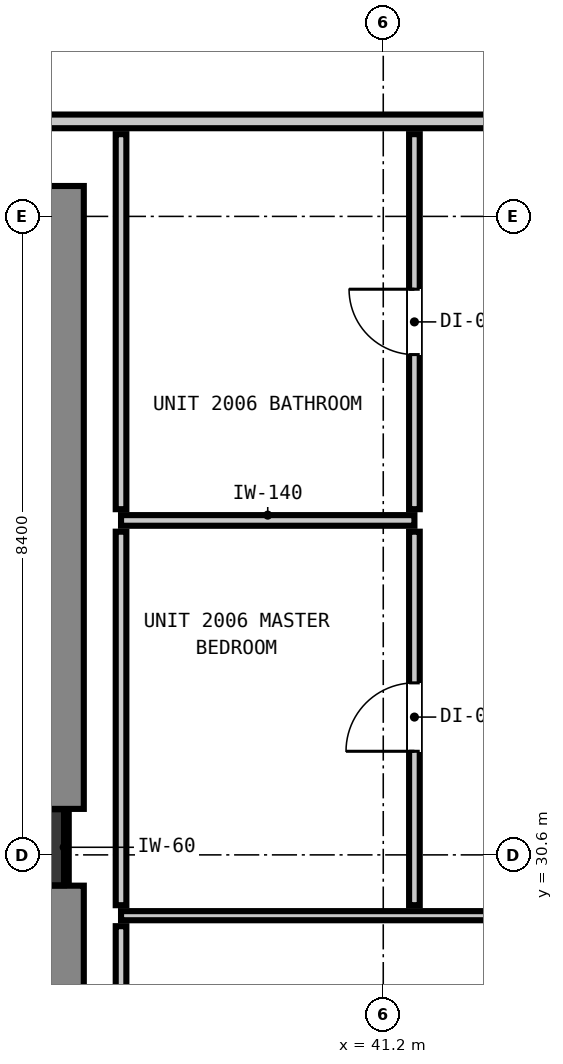
"""IFC4 building model, lengths in metres.
Left out: names, types, materials, properties, quantities, classifications, styles, units other than length and angle.
Written with IfcOpenShell. Run it as: python <this file> out.ifc"""

import sys

from ifc_helpers import new_model, si_unit, direction, frame, frame_2d, origin, origin_2d, place, context, subcontext, project, spatial, rectangle, extrude, element, fill, save


model = new_model("IFC4")
c1 = context("Model", 3, precision=1e-05, world=origin(), true_north=direction((0.0, 1.0)))
c2 = subcontext(c1, "Body", "Model", "MODEL_VIEW")
j1 = project(units=[si_unit("LENGTHUNIT", "METRE"), si_unit("PLANEANGLEUNIT", "RADIAN")], contexts=[c1])
p1 = place(None, origin())
s1 = spatial("IfcSite", under=j1, at=p1, CompositionType="ELEMENT")
p2 = place(p1, origin())
s2 = spatial("IfcBuilding", under=s1, at=p2, CompositionType="ELEMENT")
p3 = place(p2, frame((0.0, 0.0, 71.8)))
s3 = spatial("IfcBuildingStorey", under=s2, at=p3, CompositionType="ELEMENT", Elevation=71.8)
p4 = place(p3, frame((36.5, 30.7, 0.0), z_axis=(0.0, 0.0, 1.0), x_axis=(1.0, 0.0, 0.0)))
e1 = element("IfcColumn", 1, at=p4, inside=s3, PredefinedType="COLUMN", context=c2, shape_type="SweptSolid", body=[
    extrude(rectangle(XDim=1.0, YDim=1.0, at=origin_2d()), origin(), (0.0, 0.0, 1.0), 3.32),
])
p5 = place(p3, frame((36.66, 22.0, 0.0), z_axis=(0.0, 0.0, 1.0), x_axis=(0.0, 1.0, 0.0)))
e2 = element("IfcWall", 2, at=p5, inside=s3, PredefinedType="SHEAR", context=c2, shape_type="SweptSolid", body=[
    extrude(rectangle(XDim=8.195, YDim=1.2, at=frame_2d((4.098, 0.0))), origin(), (0.0, 0.0, 1.0), 3.32),
])
p6 = place(p3, frame((36.66, 31.205, 0.0), z_axis=(0.0, 0.0, 1.0), x_axis=(0.0, 1.0, 0.0)))
e3 = element("IfcWall", 3, at=p6, inside=s3, PredefinedType="SHEAR", context=c2, shape_type="SweptSolid", body=[
    extrude(rectangle(XDim=8.195, YDim=1.2, at=frame_2d((4.097, 0.0))), origin(), (0.0, 0.0, 1.0), 3.32),
])
p7 = place(p3, frame((10.15, 40.25, 0.0), z_axis=(0.0, 0.0, 1.0), x_axis=(1.0, 0.0, 0.0)))
e4 = element("IfcWall", 4, at=p7, inside=s3, PredefinedType="PARTITIONING", context=c2, shape_type="SweptSolid", body=[
    extrude(rectangle(XDim=40.023, YDim=0.18, at=frame_2d((20.012, 0.0))), origin(), (0.0, 0.0, 1.0), 3.06),
])
p8 = place(p7, frame((7.285, 0.0, 0.0)))
e5 = element("IfcOpeningElement", 5, at=p8, cuts=e4, PredefinedType="OPENING", context=c2, shape_type="SweptSolid", body=[
    extrude(rectangle(XDim=1.4, YDim=2.15, at=frame_2d((0.7, 1.075))), frame((0.0, 0.1, 0.0), z_axis=(0.0, -1.0, 0.0), x_axis=(1.0, 0.0, 0.0)), (0.0, 0.0, 1.0), 0.2),
])
p9 = place(p7, frame((0.324, 0.0, 0.0)))
e6 = element("IfcOpeningElement", 6, at=p9, cuts=e4, PredefinedType="OPENING", context=c2, shape_type="SweptSolid", body=[
    extrude(rectangle(XDim=1.4, YDim=2.15, at=frame_2d((0.7, 1.075))), frame((0.0, 0.1, 0.0), z_axis=(0.0, -1.0, 0.0), x_axis=(1.0, 0.0, 0.0)), (0.0, 0.0, 1.0), 0.2),
])
p10 = place(p7, frame((33.574, 0.0, 0.0)))
e7 = element("IfcOpeningElement", 7, at=p10, cuts=e4, PredefinedType="OPENING", context=c2, shape_type="SweptSolid", body=[
    extrude(rectangle(XDim=1.0, YDim=2.15, at=frame_2d((0.5, 1.075))), frame((0.0, 0.1, 0.0), z_axis=(0.0, -1.0, 0.0), x_axis=(1.0, 0.0, 0.0)), (0.0, 0.0, 1.0), 0.2),
])
p11 = place(p3, frame((37.75, 35.0, 0.0), z_axis=(0.0, 0.0, 1.0), x_axis=(1.0, 0.0, 0.0)))
e8 = element("IfcWall", 8, at=p11, inside=s3, PredefinedType="PARTITIONING", context=c2, shape_type="SweptSolid", body=[
    extrude(rectangle(XDim=3.86, YDim=0.14, at=frame_2d((1.93, 0.0))), origin(), (0.0, 0.0, 1.0), 3.06),
])
p12 = place(p3, frame((37.75, 29.8, 0.0), z_axis=(0.0, 0.0, 1.0), x_axis=(1.0, 0.0, 0.0)))
e9 = element("IfcWall", 9, at=p12, inside=s3, PredefinedType="PARTITIONING", context=c2, shape_type="SweptSolid", body=[
    extrude(rectangle(XDim=12.423, YDim=0.12, at=frame_2d((6.211, 0.0))), origin(), (0.0, 0.0, 1.0), 3.06),
])
p13 = place(p3, frame((37.75, 21.348, 0.0), z_axis=(0.0, 0.0, 1.0), x_axis=(0.0, 1.0, 0.0)))
e10 = element("IfcWall", 10, at=p13, inside=s3, PredefinedType="PARTITIONING", context=c2, shape_type="SweptSolid", body=[
    extrude(rectangle(XDim=8.314, YDim=0.14, at=frame_2d((4.157, 0.0))), origin(), (0.0, 0.0, 1.0), 3.06),
])
p14 = place(p3, frame((37.75, 29.938, 0.0), z_axis=(0.0, 0.0, 1.0), x_axis=(0.0, 1.0, 0.0)))
e11 = element("IfcWall", 11, at=p14, inside=s3, PredefinedType="PARTITIONING", context=c2, shape_type="SweptSolid", body=[
    extrude(rectangle(XDim=4.914, YDim=0.14, at=frame_2d((2.457, 0.0))), origin(), (0.0, 0.0, 1.0), 3.06),
])
p15 = place(p3, frame((37.75, 35.148, 0.0), z_axis=(0.0, 0.0, 1.0), x_axis=(0.0, 1.0, 0.0)))
e12 = element("IfcWall", 12, at=p15, inside=s3, PredefinedType="PARTITIONING", context=c2, shape_type="SweptSolid", body=[
    extrude(rectangle(XDim=4.934, YDim=0.14, at=frame_2d((2.467, 0.0))), origin(), (0.0, 0.0, 1.0), 3.06),
])
p16 = place(p3, frame((41.61, 29.938, 0.0), z_axis=(0.0, 0.0, 1.0), x_axis=(0.0, 1.0, 0.0)))
e13 = element("IfcWall", 13, at=p16, inside=s3, PredefinedType="PARTITIONING", context=c2, shape_type="SweptSolid", body=[
    extrude(rectangle(XDim=4.914, YDim=0.14, at=frame_2d((2.457, 0.0))), origin(), (0.0, 0.0, 1.0), 3.06),
])
p17 = place(p16, frame((2.025, 0.0, 0.0)))
e14 = element("IfcOpeningElement", 14, at=p17, cuts=e13, PredefinedType="OPENING", context=c2, shape_type="SweptSolid", body=[
    extrude(rectangle(XDim=0.9, YDim=2.1, at=frame_2d((0.45, 1.05))), frame((0.0, 0.08, 0.0), z_axis=(0.0, -1.0, 0.0), x_axis=(1.0, 0.0, 0.0)), (0.0, 0.0, 1.0), 0.16),
])
p18 = place(p3, frame((41.61, 35.148, 0.0), z_axis=(0.0, 0.0, 1.0), x_axis=(0.0, 1.0, 0.0)))
e15 = element("IfcWall", 15, at=p18, inside=s3, PredefinedType="PARTITIONING", context=c2, shape_type="SweptSolid", body=[
    extrude(rectangle(XDim=4.934, YDim=0.14, at=frame_2d((2.467, 0.0))), origin(), (0.0, 0.0, 1.0), 3.06),
])
p19 = place(p18, frame((2.034, 0.0, 0.0)))
e16 = element("IfcOpeningElement", 16, at=p19, cuts=e15, PredefinedType="OPENING", context=c2, shape_type="SweptSolid", body=[
    extrude(rectangle(XDim=0.86, YDim=2.02, at=frame_2d((0.43, 1.01))), frame((0.0, 0.08, 0.0), z_axis=(0.0, -1.0, 0.0), x_axis=(1.0, 0.0, 0.0)), (0.0, 0.0, 1.0), 0.16),
])
p20 = place(p3, frame((37.032, 30.21, 0.0), z_axis=(0.0, 0.0, 1.0), x_axis=(0.0, 1.0, 0.0)))
e17 = element("IfcWall", 17, at=p20, inside=s3, PredefinedType="PARTITIONING", context=c2, shape_type="SweptSolid", body=[
    extrude(rectangle(XDim=0.98, YDim=0.06, at=frame_2d((0.49, 0.0))), origin(), (0.0, 0.0, 1.0), 1.45),
])
p21 = place(p19, origin())
e18 = element("IfcDoor", 18, at=p21, inside=s3, OperationType="SINGLE_SWING_RIGHT", PredefinedType="DOOR", context=c2, shape_type="SweptSolid", body=[
    extrude(rectangle(XDim=0.86, YDim=2.02, at=frame_2d((0.43, 1.01))), frame((0.0, 0.025, 0.0), z_axis=(0.0, -1.0, 0.0), x_axis=(1.0, 0.0, 0.0)), (0.0, 0.0, 1.0), 0.05),
])
fill(e16, e18)
p22 = place(p17, origin())
e19 = element("IfcDoor", 19, at=p22, inside=s3, OperationType="SINGLE_SWING_LEFT", PredefinedType="DOOR", context=c2, shape_type="SweptSolid", body=[
    extrude(rectangle(XDim=0.9, YDim=2.1, at=frame_2d((0.45, 1.05))), frame((0.0, 0.025, 0.0), z_axis=(0.0, -1.0, 0.0), x_axis=(1.0, 0.0, 0.0)), (0.0, 0.0, 1.0), 0.05),
])
fill(e14, e19)
save(model, sys.argv[1])
